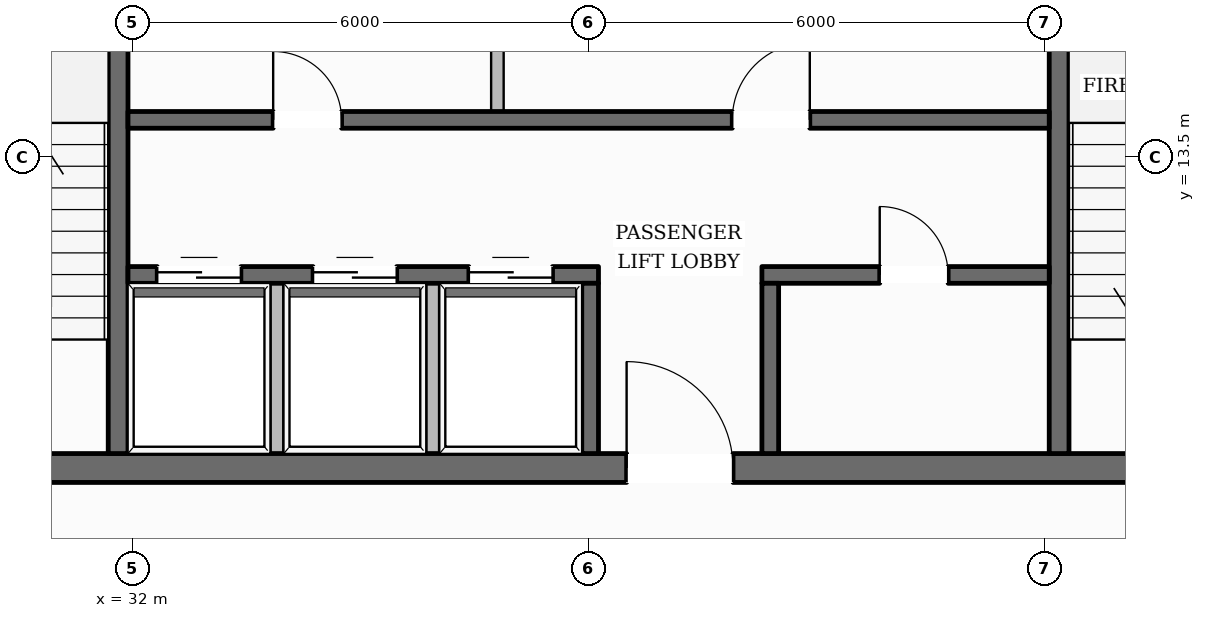
"""IFC4 building model, lengths in metres.
Left out: names, types, materials, properties, quantities, classifications, styles, units other than length and angle.
Written with IfcOpenShell. Run it as: python <this file> out.ifc"""

import sys

from ifc_helpers import new_model, si_unit, direction, frame, frame_2d, origin, place, context, subcontext, project, spatial, rectangle, extrude, element, fill, save


model = new_model("IFC4")
c1 = context("Model", 3, precision=1e-05, world=origin(), true_north=direction((0.0, 1.0)))
c2 = subcontext(c1, "Body", "Model", "MODEL_VIEW")
j1 = project(units=[si_unit("LENGTHUNIT", "METRE"), si_unit("PLANEANGLEUNIT", "RADIAN")], contexts=[c1])
p1 = place(None, origin())
s1 = spatial("IfcSite", under=j1, at=p1, CompositionType="ELEMENT")
p2 = place(p1, origin())
s2 = spatial("IfcBuilding", under=s1, at=p2, CompositionType="ELEMENT")
p3 = place(p2, frame((0.0, 0.0, 285.7)))
s3 = spatial("IfcBuildingStorey", under=s2, at=p3, CompositionType="ELEMENT", Elevation=285.7)
p4 = place(p3, frame((28.1, 9.41, 0.0), z_axis=(0.0, 0.0, 1.0), x_axis=(1.0, 0.0, 0.0)))
e1 = element("IfcWall", 1, at=p4, inside=s3, PredefinedType="SOLIDWALL", context=c2, shape_type="SweptSolid", body=[
    extrude(rectangle(XDim=19.8, YDim=0.38, at=frame_2d((9.9, 0.0))), origin(), (0.0, 0.0, 1.0), 3.61),
])
p5 = place(p4, frame((10.4, 0.0, 0.0)))
e2 = element("IfcOpeningElement", 2, at=p5, cuts=e1, PredefinedType="OPENING", context=c2, shape_type="SweptSolid", body=[
    extrude(rectangle(XDim=1.4, YDim=2.2, at=frame_2d((0.7, 1.1))), frame((0.0, 0.2, 0.0), z_axis=(0.0, -1.0, 0.0), x_axis=(1.0, 0.0, 0.0)), (0.0, 0.0, 1.0), 0.4),
])
p6 = place(p3, frame((31.81, 9.6, 0.0), z_axis=(0.0, 0.0, 1.0), x_axis=(0.0, 1.0, 0.0)))
e3 = element("IfcWall", 3, at=p6, inside=s3, PredefinedType="SHEAR", context=c2, shape_type="SweptSolid", body=[
    extrude(rectangle(XDim=13.0, YDim=0.26, at=frame_2d((6.5, 0.0))), origin(), (0.0, 0.0, 1.0), 3.61),
])
p7 = place(p6, frame((10.925, 0.0, 0.0)))
e4 = element("IfcOpeningElement", 4, at=p7, cuts=e3, PredefinedType="OPENING", context=c2, shape_type="SweptSolid", body=[
    extrude(rectangle(XDim=1.25, YDim=2.25, at=frame_2d((0.625, 1.125))), frame((0.0, 0.14, 0.0), z_axis=(0.0, -1.0, 0.0), x_axis=(1.0, 0.0, 0.0)), (0.0, 0.0, 1.0), 0.28),
])
p8 = place(p3, frame((44.19, 9.6, 0.0), z_axis=(0.0, 0.0, 1.0), x_axis=(0.0, 1.0, 0.0)))
e5 = element("IfcWall", 5, at=p8, inside=s3, PredefinedType="SHEAR", context=c2, shape_type="SweptSolid", body=[
    extrude(rectangle(XDim=13.0, YDim=0.26, at=frame_2d((6.5, 0.0))), origin(), (0.0, 0.0, 1.0), 3.61),
])
p9 = place(p8, frame((10.925, 0.0, 0.0)))
e6 = element("IfcOpeningElement", 6, at=p9, cuts=e5, PredefinedType="OPENING", context=c2, shape_type="SweptSolid", body=[
    extrude(rectangle(XDim=1.25, YDim=2.25, at=frame_2d((0.625, 1.125))), frame((0.0, 0.14, 0.0), z_axis=(0.0, -1.0, 0.0), x_axis=(1.0, 0.0, 0.0)), (0.0, 0.0, 1.0), 0.28),
])
p10 = place(p3, frame((31.94, 13.99, 0.0), z_axis=(0.0, 0.0, 1.0), x_axis=(1.0, 0.0, 0.0)))
e7 = element("IfcWall", 7, at=p10, inside=s3, PredefinedType="SOLIDWALL", context=c2, shape_type="SweptSolid", body=[
    extrude(rectangle(XDim=12.12, YDim=0.22, at=frame_2d((6.06, 0.0))), origin(), (0.0, 0.0, 1.0), 3.61),
])
p11 = place(p10, frame((1.91, 0.0, 0.0)))
e8 = element("IfcOpeningElement", 8, at=p11, cuts=e7, PredefinedType="OPENING", context=c2, shape_type="SweptSolid", body=[
    extrude(rectangle(XDim=0.9, YDim=2.1, at=frame_2d((0.45, 1.05))), frame((0.0, 0.12, 0.0), z_axis=(0.0, -1.0, 0.0), x_axis=(1.0, 0.0, 0.0)), (0.0, 0.0, 1.0), 0.24),
])
p12 = place(p10, frame((7.95, 0.0, 0.0)))
e9 = element("IfcOpeningElement", 9, at=p12, cuts=e7, PredefinedType="OPENING", context=c2, shape_type="SweptSolid", body=[
    extrude(rectangle(XDim=1.02, YDim=2.15, at=frame_2d((0.51, 1.075))), frame((0.0, 0.12, 0.0), z_axis=(0.0, -1.0, 0.0), x_axis=(1.0, 0.0, 0.0)), (0.0, 0.0, 1.0), 0.24),
])
p13 = place(p3, frame((31.94, 11.95, 0.0), z_axis=(0.0, 0.0, 1.0), x_axis=(1.0, 0.0, 0.0)))
e10 = element("IfcWall", 10, at=p13, inside=s3, PredefinedType="SOLIDWALL", context=c2, shape_type="SweptSolid", body=[
    extrude(rectangle(XDim=6.19, YDim=0.22, at=frame_2d((3.095, 0.0))), origin(), (0.0, 0.0, 1.0), 3.61),
])
p14 = place(p13, frame((0.385, 0.0, 0.0)))
e11 = element("IfcOpeningElement", 11, at=p14, cuts=e10, PredefinedType="OPENING", context=c2, shape_type="SweptSolid", body=[
    extrude(rectangle(XDim=1.1, YDim=2.2, at=frame_2d((0.55, 1.1))), frame((0.0, 0.12, 0.0), z_axis=(0.0, -1.0, 0.0), x_axis=(1.0, 0.0, 0.0)), (0.0, 0.0, 1.0), 0.24),
])
p15 = place(p13, frame((2.435, 0.0, 0.0)))
e12 = element("IfcOpeningElement", 12, at=p15, cuts=e10, PredefinedType="OPENING", context=c2, shape_type="SweptSolid", body=[
    extrude(rectangle(XDim=1.1, YDim=2.2, at=frame_2d((0.55, 1.1))), frame((0.0, 0.12, 0.0), z_axis=(0.0, -1.0, 0.0), x_axis=(1.0, 0.0, 0.0)), (0.0, 0.0, 1.0), 0.24),
])
p16 = place(p13, frame((4.485, 0.0, 0.0)))
e13 = element("IfcOpeningElement", 13, at=p16, cuts=e10, PredefinedType="OPENING", context=c2, shape_type="SweptSolid", body=[
    extrude(rectangle(XDim=1.1, YDim=2.2, at=frame_2d((0.55, 1.1))), frame((0.0, 0.12, 0.0), z_axis=(0.0, -1.0, 0.0), x_axis=(1.0, 0.0, 0.0)), (0.0, 0.0, 1.0), 0.24),
])
p17 = place(p3, frame((40.28, 11.95, 0.0), z_axis=(0.0, 0.0, 1.0), x_axis=(1.0, 0.0, 0.0)))
e14 = element("IfcWall", 14, at=p17, inside=s3, PredefinedType="SOLIDWALL", context=c2, shape_type="SweptSolid", body=[
    extrude(rectangle(XDim=3.78, YDim=0.22, at=frame_2d((1.89, 0.0))), origin(), (0.0, 0.0, 1.0), 3.61),
])
p18 = place(p17, frame((1.55, 0.0, 0.0)))
e15 = element("IfcOpeningElement", 15, at=p18, cuts=e14, PredefinedType="OPENING", context=c2, shape_type="SweptSolid", body=[
    extrude(rectangle(XDim=0.9, YDim=2.1, at=frame_2d((0.45, 1.05))), frame((0.0, 0.12, 0.0), z_axis=(0.0, -1.0, 0.0), x_axis=(1.0, 0.0, 0.0)), (0.0, 0.0, 1.0), 0.24),
])
for number, where, z_axis, x_axis in (
    (16, (38.02, 9.6, 0.0), (0.0, 0.0, 1.0), (0.0, 1.0, 0.0)),
    (17, (40.39, 9.6, 0.0), (0.0, 0.0, 1.0), (0.0, 1.0, 0.0)),
):
    element("IfcWall", number, at=place(p3, frame(where, z_axis=z_axis, x_axis=x_axis)), inside=s3, PredefinedType="SOLIDWALL", context=c2, shape_type="SweptSolid", body=[
        extrude(rectangle(XDim=2.24, YDim=0.22, at=frame_2d((1.12, 0.0))), origin(), (0.0, 0.0, 1.0), 3.61),
    ])
p19 = place(p3, frame((15.195, 10.019, 0.0), z_axis=(0.0, 0.0, 1.0), x_axis=(0.508088294866, 0.861304989316, 0.0)))
e18 = element("IfcWall", 18, at=p19, inside=s3, PredefinedType="STANDARD", context=c2, shape_type="SweptSolid", body=[
    extrude(rectangle(XDim=39.26, YDim=0.35, at=frame_2d((19.63, 0.0))), origin(), (0.0, 0.0, 1.0), 3.196),
])
p20 = place(p19, frame((28.845, 0.0, 0.0)))
e19 = element("IfcOpeningElement", 19, at=p20, cuts=e18, PredefinedType="OPENING", context=c2, shape_type="SweptSolid", body=[
    extrude(rectangle(XDim=1.0, YDim=2.2, at=frame_2d((0.5, 1.1))), frame((0.0, 0.185, 0.0), z_axis=(0.0, -1.0, 0.0), x_axis=(1.0, 0.0, 0.0)), (0.0, 0.0, 1.0), 0.37),
])
p21 = place(p19, frame((34.922, 0.0, 0.65)))
e20 = element("IfcOpeningElement", 20, at=p21, cuts=e18, PredefinedType="OPENING", context=c2, shape_type="SweptSolid", body=[
    extrude(rectangle(XDim=1.35, YDim=1.75, at=frame_2d((0.675, 0.875))), frame((0.0, 0.185, 0.0), z_axis=(0.0, -1.0, 0.0), x_axis=(1.0, 0.0, 0.0)), (0.0, 0.0, 1.0), 0.37),
])
p22 = place(p19, frame((22.152, 0.0, 0.65)))
e21 = element("IfcOpeningElement", 21, at=p22, cuts=e18, PredefinedType="OPENING", context=c2, shape_type="SweptSolid", body=[
    extrude(rectangle(XDim=1.35, YDim=1.75, at=frame_2d((0.675, 0.875))), frame((0.0, 0.185, 0.0), z_axis=(0.0, -1.0, 0.0), x_axis=(1.0, 0.0, 0.0)), (0.0, 0.0, 1.0), 0.37),
])
p23 = place(p19, frame((9.382, 0.0, 0.65)))
e22 = element("IfcOpeningElement", 22, at=p23, cuts=e18, PredefinedType="OPENING", context=c2, shape_type="SweptSolid", body=[
    extrude(rectangle(XDim=1.35, YDim=1.75, at=frame_2d((0.675, 0.875))), frame((0.0, 0.185, 0.0), z_axis=(0.0, -1.0, 0.0), x_axis=(1.0, 0.0, 0.0)), (0.0, 0.0, 1.0), 0.37),
])
p24 = place(p19, frame((2.997, 0.0, 0.65)))
e23 = element("IfcOpeningElement", 23, at=p24, cuts=e18, PredefinedType="OPENING", context=c2, shape_type="SweptSolid", body=[
    extrude(rectangle(XDim=1.35, YDim=1.75, at=frame_2d((0.675, 0.875))), frame((0.0, 0.185, 0.0), z_axis=(0.0, -1.0, 0.0), x_axis=(1.0, 0.0, 0.0)), (0.0, 0.0, 1.0), 0.37),
])
p25 = place(p3, frame((40.742, 43.905, 0.0), z_axis=(0.0, 0.0, 1.0), x_axis=(0.49863744838, -0.866810645454, 0.0)))
e24 = element("IfcWall", 24, at=p25, inside=s3, PredefinedType="STANDARD", context=c2, shape_type="SweptSolid", body=[
    extrude(rectangle(XDim=38.525, YDim=0.35, at=frame_2d((19.262, 0.0))), origin(), (0.0, 0.0, 1.0), 3.196),
])
p26 = place(p25, frame((34.24, 0.0, 0.65)))
e25 = element("IfcOpeningElement", 25, at=p26, cuts=e24, PredefinedType="OPENING", context=c2, shape_type="SweptSolid", body=[
    extrude(rectangle(XDim=1.35, YDim=1.75, at=frame_2d((0.675, 0.875))), frame((0.0, 0.185, 0.0), z_axis=(0.0, -1.0, 0.0), x_axis=(1.0, 0.0, 0.0)), (0.0, 0.0, 1.0), 0.37),
])
p27 = place(p25, frame((27.979, 0.0, 0.65)))
e26 = element("IfcOpeningElement", 26, at=p27, cuts=e24, PredefinedType="OPENING", context=c2, shape_type="SweptSolid", body=[
    extrude(rectangle(XDim=1.35, YDim=1.75, at=frame_2d((0.675, 0.875))), frame((0.0, 0.185, 0.0), z_axis=(0.0, -1.0, 0.0), x_axis=(1.0, 0.0, 0.0)), (0.0, 0.0, 1.0), 0.37),
])
p28 = place(p25, frame((21.719, 0.0, 0.65)))
e27 = element("IfcOpeningElement", 27, at=p28, cuts=e24, PredefinedType="OPENING", context=c2, shape_type="SweptSolid", body=[
    extrude(rectangle(XDim=1.35, YDim=1.75, at=frame_2d((0.675, 0.875))), frame((0.0, 0.185, 0.0), z_axis=(0.0, -1.0, 0.0), x_axis=(1.0, 0.0, 0.0)), (0.0, 0.0, 1.0), 0.37),
])
p29 = place(p25, frame((9.197, 0.0, 0.65)))
e28 = element("IfcOpeningElement", 28, at=p29, cuts=e24, PredefinedType="OPENING", context=c2, shape_type="SweptSolid", body=[
    extrude(rectangle(XDim=1.35, YDim=1.75, at=frame_2d((0.675, 0.875))), frame((0.0, 0.185, 0.0), z_axis=(0.0, -1.0, 0.0), x_axis=(1.0, 0.0, 0.0)), (0.0, 0.0, 1.0), 0.37),
])
p30 = place(p25, frame((2.936, 0.0, 0.65)))
e29 = element("IfcOpeningElement", 29, at=p30, cuts=e24, PredefinedType="OPENING", context=c2, shape_type="SweptSolid", body=[
    extrude(rectangle(XDim=1.35, YDim=1.75, at=frame_2d((0.675, 0.875))), frame((0.0, 0.185, 0.0), z_axis=(0.0, -1.0, 0.0), x_axis=(1.0, 0.0, 0.0)), (0.0, 0.0, 1.0), 0.37),
])
for number, where, z_axis, x_axis in (
    (30, (33.9, 9.49, 0.0), (0.0, 0.0, 1.0), (0.0, 1.0, 0.0)),
    (31, (35.95, 9.49, 0.0), (0.0, 0.0, 1.0), (0.0, 1.0, 0.0)),
):
    element("IfcWall", number, at=place(p3, frame(where, z_axis=z_axis, x_axis=x_axis)), inside=s3, PredefinedType="PARTITIONING", context=c2, shape_type="SweptSolid", body=[
        extrude(rectangle(XDim=2.35, YDim=0.165, at=frame_2d((1.175, 0.0))), origin(), (0.0, 0.0, 1.0), 3.61),
    ])
p31 = place(p3, frame((36.8, 14.1, 0.0), z_axis=(0.0, 0.0, 1.0), x_axis=(0.0, 1.0, 0.0)))
e32 = element("IfcWall", 32, at=p31, inside=s3, PredefinedType="PARTITIONING", context=c2, shape_type="SweptSolid", body=[
    extrude(rectangle(XDim=2.24, YDim=0.165, at=frame_2d((1.12, 0.0))), origin(), (0.0, 0.0, 1.0), 3.61),
])
p32 = place(p5, origin())
e33 = element("IfcDoor", 33, at=p32, inside=s3, OperationType="SINGLE_SWING_LEFT", PredefinedType="DOOR", context=c2, shape_type="SweptSolid", body=[
    extrude(rectangle(XDim=1.4, YDim=2.2, at=frame_2d((0.7, 1.1))), frame((0.0, 0.025, 0.0), z_axis=(0.0, -1.0, 0.0), x_axis=(1.0, 0.0, 0.0)), (0.0, 0.0, 1.0), 0.05),
])
fill(e2, e33)
p33 = place(p14, origin())
e34 = element("IfcDoor", 34, at=p33, inside=s3, OperationType="DOUBLE_DOOR_SLIDING", PredefinedType="DOOR", context=c2, shape_type="SweptSolid", body=[
    extrude(rectangle(XDim=1.1, YDim=2.2, at=frame_2d((0.55, 1.1))), frame((0.0, 0.025, 0.0), z_axis=(0.0, -1.0, 0.0), x_axis=(1.0, 0.0, 0.0)), (0.0, 0.0, 1.0), 0.05),
])
fill(e11, e34)
p34 = place(p15, origin())
e35 = element("IfcDoor", 35, at=p34, inside=s3, OperationType="DOUBLE_DOOR_SLIDING", PredefinedType="DOOR", context=c2, shape_type="SweptSolid", body=[
    extrude(rectangle(XDim=1.1, YDim=2.2, at=frame_2d((0.55, 1.1))), frame((0.0, 0.025, 0.0), z_axis=(0.0, -1.0, 0.0), x_axis=(1.0, 0.0, 0.0)), (0.0, 0.0, 1.0), 0.05),
])
fill(e12, e35)
p35 = place(p16, origin())
e36 = element("IfcDoor", 36, at=p35, inside=s3, OperationType="DOUBLE_DOOR_SLIDING", PredefinedType="DOOR", context=c2, shape_type="SweptSolid", body=[
    extrude(rectangle(XDim=1.1, YDim=2.2, at=frame_2d((0.55, 1.1))), frame((0.0, 0.025, 0.0), z_axis=(0.0, -1.0, 0.0), x_axis=(1.0, 0.0, 0.0)), (0.0, 0.0, 1.0), 0.05),
])
fill(e13, e36)
p36 = place(p11, origin())
e37 = element("IfcDoor", 37, at=p36, inside=s3, OperationType="SINGLE_SWING_LEFT", PredefinedType="DOOR", context=c2, shape_type="SweptSolid", body=[
    extrude(rectangle(XDim=0.9, YDim=2.1, at=frame_2d((0.45, 1.05))), frame((0.0, 0.025, 0.0), z_axis=(0.0, -1.0, 0.0), x_axis=(1.0, 0.0, 0.0)), (0.0, 0.0, 1.0), 0.05),
])
fill(e8, e37)
p37 = place(p12, origin())
e38 = element("IfcDoor", 38, at=p37, inside=s3, OperationType="SINGLE_SWING_RIGHT", PredefinedType="DOOR", context=c2, shape_type="SweptSolid", body=[
    extrude(rectangle(XDim=1.02, YDim=2.15, at=frame_2d((0.51, 1.075))), frame((0.0, 0.025, 0.0), z_axis=(0.0, -1.0, 0.0), x_axis=(1.0, 0.0, 0.0)), (0.0, 0.0, 1.0), 0.05),
])
fill(e9, e38)
p38 = place(p18, origin())
e39 = element("IfcDoor", 39, at=p38, inside=s3, OperationType="SINGLE_SWING_LEFT", PredefinedType="DOOR", context=c2, shape_type="SweptSolid", body=[
    extrude(rectangle(XDim=0.9, YDim=2.1, at=frame_2d((0.45, 1.05))), frame((0.0, 0.025, 0.0), z_axis=(0.0, -1.0, 0.0), x_axis=(1.0, 0.0, 0.0)), (0.0, 0.0, 1.0), 0.05),
])
fill(e15, e39)
save(model, sys.argv[1])
